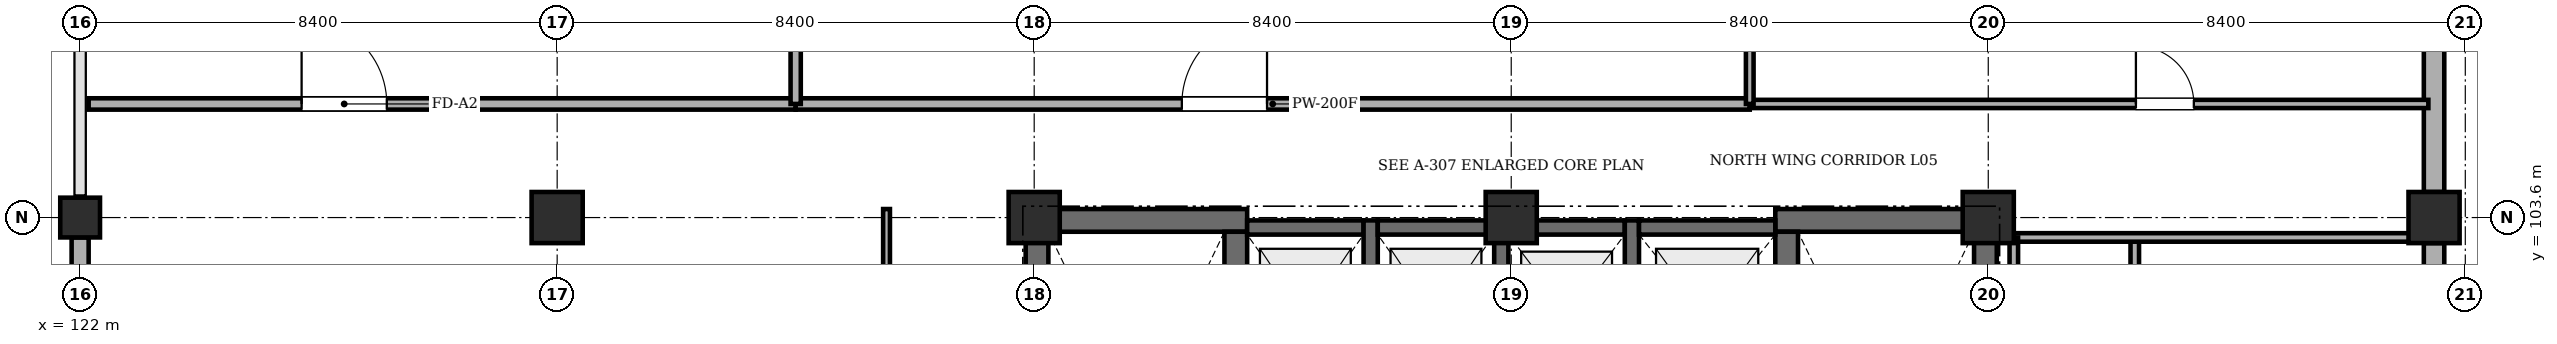
"""IFC4 building model, lengths in metres.
Left out: names, types, materials, properties, quantities, classifications, styles, units other than length and angle.
Written with IfcOpenShell. Run it as: python <this file> out.ifc"""

import sys

from ifc_helpers import new_model, si_unit, direction, frame, frame_2d, origin, origin_2d, place, context, subcontext, project, spatial, rectangle, extrude, element, fill, save


model = new_model("IFC4")
c1 = context("Model", 3, precision=1e-05, world=origin(), true_north=direction((0.0, 1.0)))
c2 = subcontext(c1, "Body", "Model", "MODEL_VIEW")
j1 = project(units=[si_unit("LENGTHUNIT", "METRE"), si_unit("PLANEANGLEUNIT", "RADIAN")], contexts=[c1])
p1 = place(None, origin())
s1 = spatial("IfcSite", under=j1, at=p1, CompositionType="ELEMENT")
p2 = place(p1, origin())
s2 = spatial("IfcBuilding", under=s1, at=p2, CompositionType="ELEMENT")
p3 = place(p2, frame((0.0, 0.0, 19.2)))
s3 = spatial("IfcBuildingStorey", under=s2, at=p3, CompositionType="ELEMENT", Elevation=19.2)
p4 = place(p3, frame((122.0, 103.6, 0.0), z_axis=(0.0, 0.0, 1.0), x_axis=(1.0, 0.0, 0.0)))
e1 = element("IfcColumn", 1, at=p4, inside=s3, PredefinedType="COLUMN", context=c2, shape_type="SweptSolid", body=[
    extrude(rectangle(XDim=0.7, YDim=0.7, at=origin_2d()), origin(), (0.0, 0.0, 1.0), 4.02),
])
for number, where, z_axis, x_axis in (
    (2, (130.4, 103.6, 0.0), (0.0, 0.0, 1.0), (1.0, 0.0, 0.0)),
    (3, (138.8, 103.6, 0.0), (0.0, 0.0, 1.0), (1.0, 0.0, 0.0)),
    (4, (147.2, 103.6, 0.0), (0.0, 0.0, 1.0), (1.0, 0.0, 0.0)),
    (5, (155.6, 103.6, 0.0), (0.0, 0.0, 1.0), (1.0, 0.0, 0.0)),
    (6, (163.45, 103.6, 0.0), (0.0, 0.0, 1.0), (1.0, 0.0, 0.0)),
):
    element("IfcColumn", number, at=place(p3, frame(where, z_axis=z_axis, x_axis=x_axis)), inside=s3, PredefinedType="COLUMN", context=c2, shape_type="SweptSolid", body=[
        extrude(rectangle(XDim=0.9, YDim=0.9, at=origin_2d()), origin(), (0.0, 0.0, 1.0), 4.02),
    ])
p5 = place(p3, frame((138.65, 103.55, 0.0), z_axis=(0.0, 0.0, 1.0), x_axis=(1.0, 0.0, 0.0)))
e7 = element("IfcWall", 7, at=p5, inside=s3, PredefinedType="SHEAR", context=c2, shape_type="SweptSolid", body=[
    extrude(rectangle(XDim=3.9, YDim=0.4, at=frame_2d((1.95, 0.0))), origin(), (0.0, 0.0, 1.0), 4.02),
])
p6 = place(p3, frame((138.85, 95.45, 0.0), z_axis=(0.0, 0.0, 1.0), x_axis=(0.0, 1.0, 0.0)))
e8 = element("IfcWall", 8, at=p6, inside=s3, PredefinedType="SHEAR", context=c2, shape_type="SweptSolid", body=[
    extrude(rectangle(XDim=7.9, YDim=0.4, at=frame_2d((3.95, 0.0))), origin(), (0.0, 0.0, 1.0), 4.02),
])
p7 = place(p3, frame((142.35, 95.45, 0.0), z_axis=(0.0, 0.0, 1.0), x_axis=(0.0, 1.0, 0.0)))
e9 = element("IfcWall", 9, at=p7, inside=s3, PredefinedType="SHEAR", context=c2, shape_type="SweptSolid", body=[
    extrude(rectangle(XDim=7.9, YDim=0.4, at=frame_2d((3.95, 0.0))), origin(), (0.0, 0.0, 1.0), 4.02),
])
p8 = place(p7, frame((0.22, 0.0, 0.0)))
e10 = element("IfcOpeningElement", 10, at=p8, cuts=e9, PredefinedType="OPENING", context=c2, shape_type="SweptSolid", body=[
    extrude(rectangle(XDim=1.15, YDim=2.15, at=frame_2d((0.575, 1.075))), frame((0.0, 0.21, 0.0), z_axis=(0.0, -1.0, 0.0), x_axis=(1.0, 0.0, 0.0)), (0.0, 0.0, 1.0), 0.42),
])
p9 = place(p3, frame((151.85, 103.55, 0.0), z_axis=(0.0, 0.0, 1.0), x_axis=(1.0, 0.0, 0.0)))
e11 = element("IfcWall", 11, at=p9, inside=s3, PredefinedType="SHEAR", context=c2, shape_type="SweptSolid", body=[
    extrude(rectangle(XDim=3.9, YDim=0.4, at=frame_2d((1.95, 0.0))), origin(), (0.0, 0.0, 1.0), 4.02),
])
p10 = place(p3, frame((152.05, 95.45, 0.0), z_axis=(0.0, 0.0, 1.0), x_axis=(0.0, 1.0, 0.0)))
e12 = element("IfcWall", 12, at=p10, inside=s3, PredefinedType="SHEAR", context=c2, shape_type="SweptSolid", body=[
    extrude(rectangle(XDim=7.9, YDim=0.4, at=frame_2d((3.95, 0.0))), origin(), (0.0, 0.0, 1.0), 4.02),
])
p11 = place(p10, frame((0.35, 0.0, 0.0)))
e13 = element("IfcOpeningElement", 13, at=p11, cuts=e12, PredefinedType="OPENING", context=c2, shape_type="SweptSolid", body=[
    extrude(rectangle(XDim=1.15, YDim=2.15, at=frame_2d((0.575, 1.075))), frame((0.0, 0.21, 0.0), z_axis=(0.0, -1.0, 0.0), x_axis=(1.0, 0.0, 0.0)), (0.0, 0.0, 1.0), 0.42),
])
p12 = place(p3, frame((155.55, 95.45, 0.0), z_axis=(0.0, 0.0, 1.0), x_axis=(0.0, 1.0, 0.0)))
e14 = element("IfcWall", 14, at=p12, inside=s3, PredefinedType="SHEAR", context=c2, shape_type="SweptSolid", body=[
    extrude(rectangle(XDim=7.9, YDim=0.4, at=frame_2d((3.95, 0.0))), origin(), (0.0, 0.0, 1.0), 4.02),
])
p13 = place(p3, frame((142.55, 103.425, 0.0), z_axis=(0.0, 0.0, 1.0), x_axis=(1.0, 0.0, 0.0)))
e15 = element("IfcWall", 15, at=p13, inside=s3, PredefinedType="SHEAR", context=c2, shape_type="SweptSolid", body=[
    extrude(rectangle(XDim=2.05, YDim=0.25, at=frame_2d((1.025, 0.0))), origin(), (0.0, 0.0, 1.0), 4.02),
])
p14 = place(p3, frame((144.725, 100.15, 0.0), z_axis=(0.0, 0.0, 1.0), x_axis=(0.0, 1.0, 0.0)))
e16 = element("IfcWall", 16, at=p14, inside=s3, PredefinedType="SHEAR", context=c2, shape_type="SweptSolid", body=[
    extrude(rectangle(XDim=3.4, YDim=0.25, at=frame_2d((1.7, 0.0))), origin(), (0.0, 0.0, 1.0), 4.02),
])
p15 = place(p3, frame((144.85, 103.425, 0.0), z_axis=(0.0, 0.0, 1.0), x_axis=(1.0, 0.0, 0.0)))
e17 = element("IfcWall", 17, at=p15, inside=s3, PredefinedType="SHEAR", context=c2, shape_type="SweptSolid", body=[
    extrude(rectangle(XDim=2.05, YDim=0.25, at=frame_2d((1.025, 0.0))), origin(), (0.0, 0.0, 1.0), 4.02),
])
p16 = place(p3, frame((147.025, 100.15, 0.0), z_axis=(0.0, 0.0, 1.0), x_axis=(0.0, 1.0, 0.0)))
e18 = element("IfcWall", 18, at=p16, inside=s3, PredefinedType="SHEAR", context=c2, shape_type="SweptSolid", body=[
    extrude(rectangle(XDim=3.4, YDim=0.25, at=frame_2d((1.7, 0.0))), origin(), (0.0, 0.0, 1.0), 4.02),
])
p17 = place(p3, frame((147.15, 103.425, 0.0), z_axis=(0.0, 0.0, 1.0), x_axis=(1.0, 0.0, 0.0)))
e19 = element("IfcWall", 19, at=p17, inside=s3, PredefinedType="SHEAR", context=c2, shape_type="SweptSolid", body=[
    extrude(rectangle(XDim=2.05, YDim=0.25, at=frame_2d((1.025, 0.0))), origin(), (0.0, 0.0, 1.0), 4.02),
])
p18 = place(p3, frame((149.325, 100.35, 0.0), z_axis=(0.0, 0.0, 1.0), x_axis=(0.0, 1.0, 0.0)))
e20 = element("IfcWall", 20, at=p18, inside=s3, PredefinedType="SHEAR", context=c2, shape_type="SweptSolid", body=[
    extrude(rectangle(XDim=3.2, YDim=0.25, at=frame_2d((1.6, 0.0))), origin(), (0.0, 0.0, 1.0), 4.02),
])
p19 = place(p3, frame((149.45, 103.425, 0.0), z_axis=(0.0, 0.0, 1.0), x_axis=(1.0, 0.0, 0.0)))
e21 = element("IfcWall", 21, at=p19, inside=s3, PredefinedType="SHEAR", context=c2, shape_type="SweptSolid", body=[
    extrude(rectangle(XDim=2.4, YDim=0.25, at=frame_2d((1.2, 0.0))), origin(), (0.0, 0.0, 1.0), 4.02),
])
p20 = place(p3, frame((163.45, 103.15, 0.0), z_axis=(0.0, 0.0, 1.0), x_axis=(0.0, -1.0, 0.0)))
e22 = element("IfcWall", 22, at=p20, inside=s3, PredefinedType="STANDARD", context=c2, shape_type="SweptSolid", body=[
    extrude(rectangle(XDim=7.5, YDim=0.36, at=frame_2d((3.75, 0.0))), origin(), (0.0, 0.0, 1.0), 3.32),
])
p21 = place(p20, frame((1.15, 0.0, 1.1)))
e23 = element("IfcOpeningElement", 23, at=p21, cuts=e22, PredefinedType="OPENING", context=c2, shape_type="SweptSolid", body=[
    extrude(rectangle(XDim=1.4, YDim=1.4, at=frame_2d((0.7, 0.7))), frame((0.0, 0.19, 0.0), z_axis=(0.0, -1.0, 0.0), x_axis=(1.0, 0.0, 0.0)), (0.0, 0.0, 1.0), 0.38),
])
p22 = place(p3, frame((163.45, 111.0, 0.0), z_axis=(0.0, 0.0, 1.0), x_axis=(0.0, -1.0, 0.0)))
e24 = element("IfcWall", 24, at=p22, inside=s3, PredefinedType="STANDARD", context=c2, shape_type="SweptSolid", body=[
    extrude(rectangle(XDim=6.95, YDim=0.36, at=frame_2d((3.475, 0.0))), origin(), (0.0, 0.0, 1.0), 3.32),
])
p23 = place(p22, frame((1.15, 0.0, 1.1)))
e25 = element("IfcOpeningElement", 25, at=p23, cuts=e24, PredefinedType="OPENING", context=c2, shape_type="SweptSolid", body=[
    extrude(rectangle(XDim=1.8, YDim=1.8, at=frame_2d((0.9, 0.9))), frame((0.0, 0.19, 0.0), z_axis=(0.0, -1.0, 0.0), x_axis=(1.0, 0.0, 0.0)), (0.0, 0.0, 1.0), 0.38),
])
p24 = place(p3, frame((122.0, 95.55, 0.0), z_axis=(0.0, 0.0, 1.0), x_axis=(0.0, 1.0, 0.0)))
e26 = element("IfcWall", 26, at=p24, inside=s3, PredefinedType="STANDARD", context=c2, shape_type="SweptSolid", body=[
    extrude(rectangle(XDim=7.7, YDim=0.3, at=frame_2d((3.85, 0.0))), origin(), (0.0, 0.0, 1.0), 3.32),
])
p25 = place(p24, frame((2.4, 0.0, 1.0)))
e27 = element("IfcOpeningElement", 27, at=p25, cuts=e26, PredefinedType="OPENING", context=c2, shape_type="SweptSolid", body=[
    extrude(rectangle(XDim=1.8, YDim=1.8, at=frame_2d((0.9, 0.9))), frame((0.0, 0.16, 0.0), z_axis=(0.0, -1.0, 0.0), x_axis=(1.0, 0.0, 0.0)), (0.0, 0.0, 1.0), 0.32),
])
p26 = place(p3, frame((158.18, 94.68, 0.0), z_axis=(0.0, 0.0, 1.0), x_axis=(0.0, 1.0, 0.0)))
e28 = element("IfcWall", 28, at=p26, inside=s3, PredefinedType="PARTITIONING", context=c2, shape_type="SweptSolid", body=[
    extrude(rectangle(XDim=8.57, YDim=0.15, at=frame_2d((4.285, 0.0))), origin(), (0.0, 0.0, 1.0), 4.02),
])
p27 = place(p26, frame((0.8, 0.0, 0.0)))
e29 = element("IfcOpeningElement", 29, at=p27, cuts=e28, PredefinedType="OPENING", context=c2, shape_type="SweptSolid", body=[
    extrude(rectangle(XDim=1.0, YDim=2.12, at=frame_2d((0.5, 1.06))), frame((0.0, 0.085, 0.0), z_axis=(0.0, -1.0, 0.0), x_axis=(1.0, 0.0, 0.0)), (0.0, 0.0, 1.0), 0.17),
])
p28 = place(p26, frame((3.5, 0.0, 0.0)))
e30 = element("IfcOpeningElement", 30, at=p28, cuts=e28, PredefinedType="OPENING", context=c2, shape_type="SweptSolid", body=[
    extrude(rectangle(XDim=0.92, YDim=2.1, at=frame_2d((0.46, 1.05))), frame((0.0, 0.085, 0.0), z_axis=(0.0, -1.0, 0.0), x_axis=(1.0, 0.0, 0.0)), (0.0, 0.0, 1.0), 0.17),
])
p29 = place(p26, frame((6.4, 0.0, 0.0)))
e31 = element("IfcOpeningElement", 31, at=p29, cuts=e28, PredefinedType="OPENING", context=c2, shape_type="SweptSolid", body=[
    extrude(rectangle(XDim=0.92, YDim=2.1, at=frame_2d((0.46, 1.05))), frame((0.0, 0.085, 0.0), z_axis=(0.0, -1.0, 0.0), x_axis=(1.0, 0.0, 0.0)), (0.0, 0.0, 1.0), 0.17),
])
p30 = place(p3, frame((156.05, 103.25, 0.0), z_axis=(0.0, 0.0, 1.0), x_axis=(1.0, 0.0, 0.0)))
e32 = element("IfcWall", 32, at=p30, inside=s3, PredefinedType="PARTITIONING", context=c2, shape_type="SweptSolid", body=[
    extrude(rectangle(XDim=7.15, YDim=0.15, at=frame_2d((3.575, 0.0))), origin(), (0.0, 0.0, 1.0), 4.02),
])
p31 = place(p3, frame((156.05, 94.68, 0.0), z_axis=(0.0, 0.0, 1.0), x_axis=(0.0, 1.0, 0.0)))
e33 = element("IfcWall", 33, at=p31, inside=s3, PredefinedType="PARTITIONING", context=c2, shape_type="SweptSolid", body=[
    extrude(rectangle(XDim=8.57, YDim=0.15, at=frame_2d((4.285, 0.0))), origin(), (0.0, 0.0, 1.0), 4.02),
])
p32 = place(p3, frame((136.2, 94.68, 0.0), z_axis=(0.0, 0.0, 1.0), x_axis=(0.0, 1.0, 0.0)))
e34 = element("IfcWall", 34, at=p32, inside=s3, PredefinedType="PARTITIONING", context=c2, shape_type="SweptSolid", body=[
    extrude(rectangle(XDim=9.07, YDim=0.12, at=frame_2d((4.535, 0.0))), origin(), (0.0, 0.0, 1.0), 4.02),
])
p33 = place(p3, frame((122.15, 105.6, 0.0), z_axis=(0.0, 0.0, 1.0), x_axis=(1.0, 0.0, 0.0)))
e35 = element("IfcWall", 35, at=p33, inside=s3, PredefinedType="SOLIDWALL", context=c2, shape_type="SweptSolid", body=[
    extrude(rectangle(XDim=12.45, YDim=0.2, at=frame_2d((6.225, 0.0))), origin(), (0.0, 0.0, 1.0), 4.02),
])
p34 = place(p33, frame((3.75, 0.0, 0.0)))
e36 = element("IfcOpeningElement", 36, at=p34, cuts=e35, PredefinedType="OPENING", context=c2, shape_type="SweptSolid", body=[
    extrude(rectangle(XDim=1.5, YDim=2.2, at=frame_2d((0.75, 1.1))), frame((0.0, 0.11, 0.0), z_axis=(0.0, -1.0, 0.0), x_axis=(1.0, 0.0, 0.0)), (0.0, 0.0, 1.0), 0.22),
])
p35 = place(p3, frame((134.6, 105.6, 0.0), z_axis=(0.0, 0.0, 1.0), x_axis=(1.0, 0.0, 0.0)))
e37 = element("IfcWall", 37, at=p35, inside=s3, PredefinedType="SOLIDWALL", context=c2, shape_type="SweptSolid", body=[
    extrude(rectangle(XDim=16.8, YDim=0.2, at=frame_2d((8.4, 0.0))), origin(), (0.0, 0.0, 1.0), 4.02),
])
p36 = place(p35, frame((6.8, 0.0, 0.0)))
e38 = element("IfcOpeningElement", 38, at=p36, cuts=e37, PredefinedType="OPENING", context=c2, shape_type="SweptSolid", body=[
    extrude(rectangle(XDim=1.5, YDim=2.2, at=frame_2d((0.75, 1.1))), frame((0.0, 0.11, 0.0), z_axis=(0.0, -1.0, 0.0), x_axis=(1.0, 0.0, 0.0)), (0.0, 0.0, 1.0), 0.22),
])
p37 = place(p3, frame((134.6, 105.6, 0.0), z_axis=(0.0, 0.0, 1.0), x_axis=(0.0, 1.0, 0.0)))
e39 = element("IfcWall", 39, at=p37, inside=s3, PredefinedType="STANDARD", context=c2, shape_type="SweptSolid", body=[
    extrude(rectangle(XDim=5.75, YDim=0.18, at=frame_2d((2.875, 0.0))), origin(), (0.0, 0.0, 1.0), 3.52),
])
p38 = place(p3, frame((151.4, 105.6, 0.0), z_axis=(0.0, 0.0, 1.0), x_axis=(1.0, 0.0, 0.0)))
e40 = element("IfcWall", 40, at=p38, inside=s3, PredefinedType="PARTITIONING", context=c2, shape_type="SweptSolid", body=[
    extrude(rectangle(XDim=11.95, YDim=0.145, at=frame_2d((5.975, 0.0))), origin(), (0.0, 0.0, 1.0), 4.02),
])
p39 = place(p38, frame((6.8, 0.0, 0.0)))
e41 = element("IfcOpeningElement", 41, at=p39, cuts=e40, PredefinedType="OPENING", context=c2, shape_type="SweptSolid", body=[
    extrude(rectangle(XDim=1.02, YDim=2.15, at=frame_2d((0.51, 1.075))), frame((0.0, 0.083, 0.0), z_axis=(0.0, -1.0, 0.0), x_axis=(1.0, 0.0, 0.0)), (0.0, 0.0, 1.0), 0.165),
])
p40 = place(p3, frame((151.4, 105.6, 0.0), z_axis=(0.0, 0.0, 1.0), x_axis=(0.0, 1.0, 0.0)))
e42 = element("IfcWall", 42, at=p40, inside=s3, PredefinedType="PARTITIONING", context=c2, shape_type="SweptSolid", body=[
    extrude(rectangle(XDim=5.75, YDim=0.135, at=frame_2d((2.875, 0.0))), origin(), (0.0, 0.0, 1.0), 3.52),
])
p41 = place(p34, origin())
e43 = element("IfcDoor", 43, at=p41, inside=s3, OperationType="SINGLE_SWING_LEFT", PredefinedType="DOOR", context=c2, shape_type="SweptSolid", body=[
    extrude(rectangle(XDim=1.5, YDim=2.2, at=frame_2d((0.75, 1.1))), frame((0.0, 0.025, 0.0), z_axis=(0.0, -1.0, 0.0), x_axis=(1.0, 0.0, 0.0)), (0.0, 0.0, 1.0), 0.05),
])
fill(e36, e43)
p42 = place(p36, origin())
e44 = element("IfcDoor", 44, at=p42, inside=s3, OperationType="SINGLE_SWING_RIGHT", PredefinedType="DOOR", context=c2, shape_type="SweptSolid", body=[
    extrude(rectangle(XDim=1.5, YDim=2.2, at=frame_2d((0.75, 1.1))), frame((0.0, 0.025, 0.0), z_axis=(0.0, -1.0, 0.0), x_axis=(1.0, 0.0, 0.0)), (0.0, 0.0, 1.0), 0.05),
])
fill(e38, e44)
p43 = place(p39, origin())
e45 = element("IfcDoor", 45, at=p43, inside=s3, OperationType="SINGLE_SWING_LEFT", PredefinedType="DOOR", context=c2, shape_type="SweptSolid", body=[
    extrude(rectangle(XDim=1.02, YDim=2.15, at=frame_2d((0.51, 1.075))), frame((0.0, 0.025, 0.0), z_axis=(0.0, -1.0, 0.0), x_axis=(1.0, 0.0, 0.0)), (0.0, 0.0, 1.0), 0.05),
])
fill(e41, e45)
save(model, sys.argv[1])
